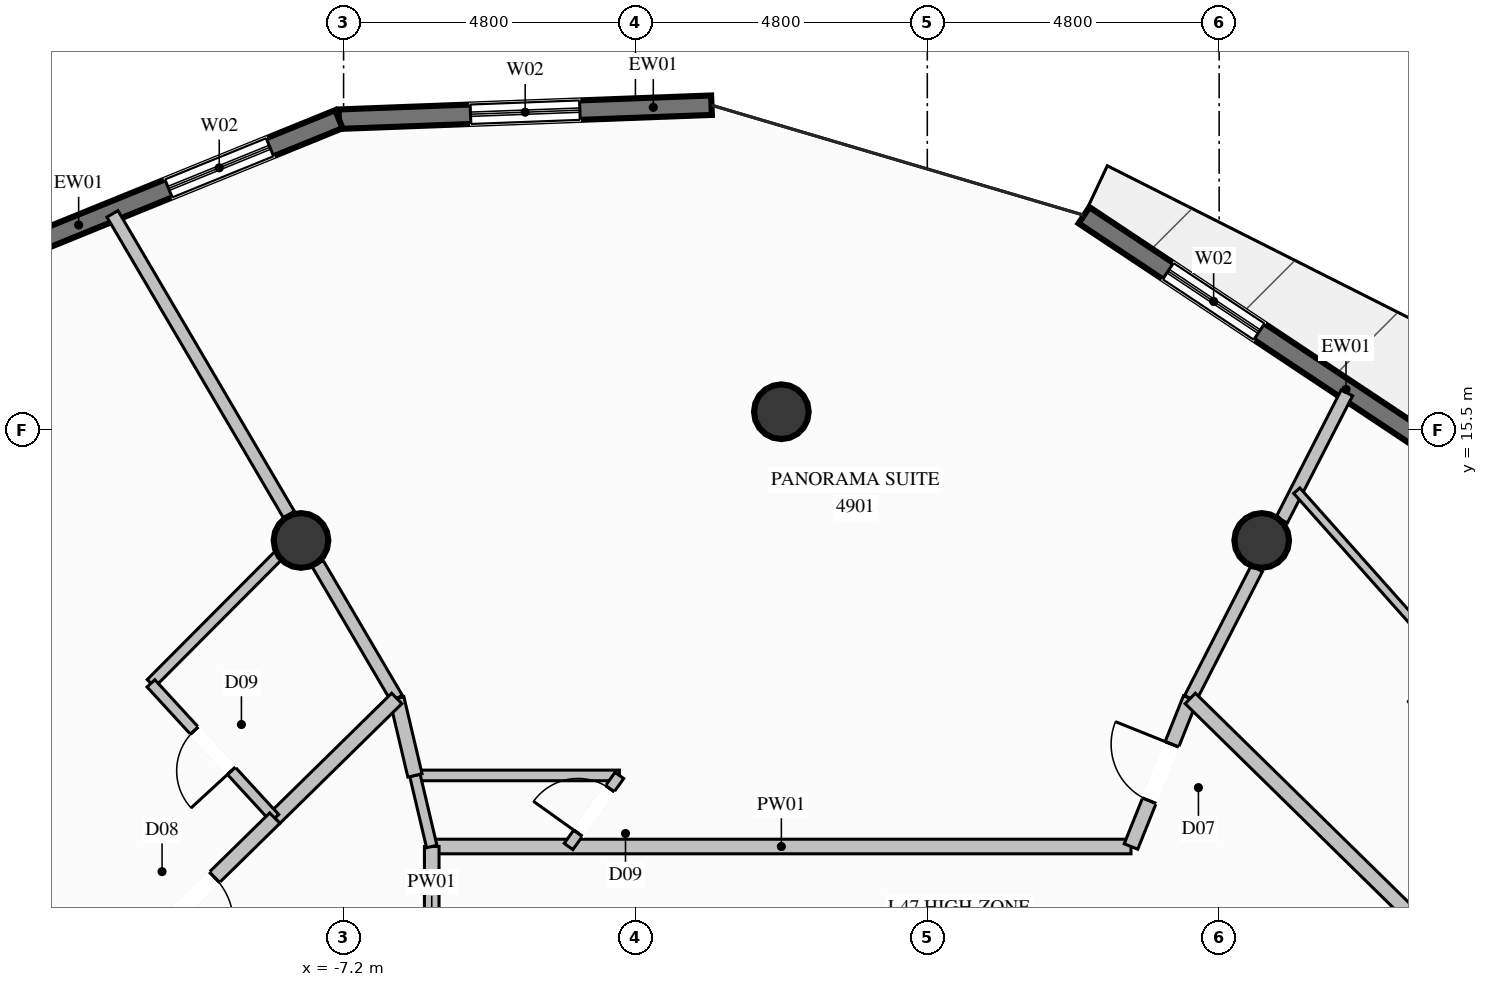
"""IFC4 building model, lengths in metres.
Left out: names, types, materials, properties, quantities, classifications, styles, units other than length and angle.
Written with IfcOpenShell. Run it as: python <this file> out.ifc"""

import sys

from ifc_helpers import new_model, si_unit, direction, frame, frame_2d, origin, origin_2d, place, context, subcontext, project, spatial, rectangle, circle, extrude, element, fill, save


model = new_model("IFC4")
c1 = context("Model", 3, precision=1e-05, world=origin(), true_north=direction((0.0, 1.0)))
c2 = subcontext(c1, "Body", "Model", "MODEL_VIEW")
j1 = project(units=[si_unit("LENGTHUNIT", "METRE"), si_unit("PLANEANGLEUNIT", "RADIAN")], contexts=[c1])
p1 = place(None, origin())
s1 = spatial("IfcSite", under=j1, at=p1, CompositionType="ELEMENT")
p2 = place(p1, origin())
s2 = spatial("IfcBuilding", under=s1, at=p2, CompositionType="ELEMENT")
p3 = place(p2, frame((0.0, 0.0, 184.0)))
s3 = spatial("IfcBuildingStorey", under=s2, at=p3, CompositionType="ELEMENT", Elevation=184.0)
for number, where, z_axis, x_axis in (
    (1, (7.9, 13.683, 0.0), (0.0, 0.0, 1.0), (1.0, 0.0, 0.0)),
    (2, (0.0, 15.8, 0.0), (0.0, 0.0, 1.0), (1.0, 0.0, 0.0)),
    (3, (-7.9, 13.683, 0.0), (0.0, 0.0, 1.0), (1.0, 0.0, 0.0)),
):
    element("IfcColumn", number, at=place(p3, frame(where, z_axis=z_axis, x_axis=x_axis)), inside=s3, PredefinedType="COLUMN", context=c2, shape_type="SweptSolid", body=[
        extrude(circle(Radius=0.45, at=origin_2d()), origin(), (0.0, 0.0, 1.0), 3.6),
    ])
p4 = place(p3, frame((4.978, 19.031, 0.0), z_axis=(0.0, 0.0, 1.0), x_axis=(0.832836009007, -0.553519811842, 0.0)))
e4 = element("IfcWall", 4, at=p4, inside=s3, PredefinedType="SOLIDWALL", context=c2, shape_type="SweptSolid", body=[
    extrude(rectangle(XDim=6.638, YDim=0.32, at=frame_2d((3.319, 0.0))), origin(), (0.0, 0.0, 1.0), 3.36),
])
p5 = place(p4, frame((1.659, 0.0, 0.35)))
e5 = element("IfcOpeningElement", 5, at=p5, cuts=e4, PredefinedType="OPENING", context=c2, shape_type="SweptSolid", body=[
    extrude(rectangle(XDim=1.8, YDim=2.6, at=frame_2d((0.9, 1.3))), frame((0.0, 0.17, 0.0), z_axis=(0.0, -1.0, 0.0), x_axis=(1.0, 0.0, 0.0)), (0.0, 0.0, 1.0), 0.34),
])
p6 = place(p3, frame((-7.277, 20.611, 0.0), z_axis=(0.0, 0.0, 1.0), x_axis=(0.999296553101, 0.037501986097, 0.0)))
e6 = element("IfcWall", 6, at=p6, inside=s3, PredefinedType="SOLIDWALL", context=c2, shape_type="SweptSolid", body=[
    extrude(rectangle(XDim=6.133, YDim=0.32, at=frame_2d((3.066, 0.0))), origin(), (0.0, 0.0, 1.0), 3.36),
])
p7 = place(p6, frame((2.166, 0.0, 0.35)))
e7 = element("IfcOpeningElement", 7, at=p7, cuts=e6, PredefinedType="OPENING", context=c2, shape_type="SweptSolid", body=[
    extrude(rectangle(XDim=1.8, YDim=2.6, at=frame_2d((0.9, 1.3))), frame((0.0, 0.17, 0.0), z_axis=(0.0, -1.0, 0.0), x_axis=(1.0, 0.0, 0.0)), (0.0, 0.0, 1.0), 0.34),
])
p8 = place(p3, frame((-12.804, 18.364, 0.0), z_axis=(0.0, 0.0, 1.0), x_axis=(0.926362198949, 0.376633875745, 0.0)))
e8 = element("IfcWall", 8, at=p8, inside=s3, PredefinedType="SOLIDWALL", context=c2, shape_type="SweptSolid", body=[
    extrude(rectangle(XDim=5.966, YDim=0.32, at=frame_2d((2.983, 0.0))), origin(), (0.0, 0.0, 1.0), 3.36),
])
p9 = place(p8, frame((2.942, 0.0, 0.35)))
e9 = element("IfcOpeningElement", 9, at=p9, cuts=e8, PredefinedType="OPENING", context=c2, shape_type="SweptSolid", body=[
    extrude(rectangle(XDim=1.8, YDim=2.6, at=frame_2d((0.9, 1.3))), frame((0.0, 0.17, 0.0), z_axis=(0.0, -1.0, 0.0), x_axis=(1.0, 0.0, 0.0)), (0.0, 0.0, 1.0), 0.34),
])
p10 = place(p3, frame((-5.75, 8.65, 0.0), z_axis=(0.0, 0.0, 1.0), x_axis=(1.0, 0.0, 0.0)))
e10 = element("IfcWall", 10, at=p10, inside=s3, PredefinedType="PARTITIONING", context=c2, shape_type="SweptSolid", body=[
    extrude(rectangle(XDim=11.5, YDim=0.24, at=frame_2d((5.75, 0.0))), origin(), (0.0, 0.0, 1.0), 3.36),
])
p11 = place(p3, frame((-5.75, 6.1, 0.0), z_axis=(0.0, 0.0, 1.0), x_axis=(0.0, 1.0, 0.0)))
e11 = element("IfcWall", 11, at=p11, inside=s3, PredefinedType="PARTITIONING", context=c2, shape_type="SweptSolid", body=[
    extrude(rectangle(XDim=2.55, YDim=0.24, at=frame_2d((1.275, 0.0))), origin(), (0.0, 0.0, 1.0), 3.36),
])
p12 = place(p3, frame((6.725, 11.085, 0.0), z_axis=(0.0, 0.0, 1.0), x_axis=(0.456025303107, 0.889966810014, 0.0)))
e12 = element("IfcWall", 12, at=p12, inside=s3, PredefinedType="PARTITIONING", context=c2, shape_type="SweptSolid", body=[
    extrude(rectangle(XDim=2.399, YDim=0.21, at=frame_2d((1.199, 0.0))), origin(), (0.0, 0.0, 1.0), 2.877),
])
p13 = place(p3, frame((8.229, 14.019, 0.0), z_axis=(0.0, 0.0, 1.0), x_axis=(0.456209070118, 0.889872622538, 0.0)))
e13 = element("IfcWall", 13, at=p13, inside=s3, PredefinedType="PARTITIONING", context=c2, shape_type="SweptSolid", body=[
    extrude(rectangle(XDim=2.35, YDim=0.21, at=frame_2d((1.175, 0.0))), origin(), (0.0, 0.0, 1.0), 3.36),
])
p14 = place(p3, frame((-6.325, 11.085, 0.0), z_axis=(0.0, 0.0, 1.0), x_axis=(-0.506285052897, 0.862366189744, 0.0)))
e14 = element("IfcWall", 14, at=p14, inside=s3, PredefinedType="PARTITIONING", context=c2, shape_type="SweptSolid", body=[
    extrude(rectangle(XDim=2.57, YDim=0.21, at=frame_2d((1.285, 0.0))), origin(), (0.0, 0.0, 1.0), 2.877),
])
p15 = place(p3, frame((-8.099, 14.109, 0.0), z_axis=(0.0, 0.0, 1.0), x_axis=(-0.506111753197, 0.862467908548, 0.0)))
e15 = element("IfcWall", 15, at=p15, inside=s3, PredefinedType="PARTITIONING", context=c2, shape_type="SweptSolid", body=[
    extrude(rectangle(XDim=5.734, YDim=0.21, at=frame_2d((2.867, 0.0))), origin(), (0.0, 0.0, 1.0), 3.36),
])
p16 = place(p3, frame((-6.026, 9.819, 0.0), z_axis=(0.0, 0.0, 1.0), x_axis=(1.0, 0.0, 0.0)))
e16 = element("IfcWall", 16, at=p16, inside=s3, PredefinedType="PLUMBINGWALL", context=c2, shape_type="SweptSolid", body=[
    extrude(rectangle(XDim=3.362, YDim=0.175, at=frame_2d((1.681, 0.0))), origin(), (0.0, 0.0, 1.0), 3.043),
])
p17 = place(p3, frame((-6.026, 9.819, 0.0), z_axis=(0.0, 0.0, 1.0), x_axis=(0.229650980365, -0.973273048644, 0.0)))
e17 = element("IfcWall", 17, at=p17, inside=s3, PredefinedType="PLUMBINGWALL", context=c2, shape_type="SweptSolid", body=[
    extrude(rectangle(XDim=1.201, YDim=0.175, at=frame_2d((0.601, 0.0))), origin(), (0.0, 0.0, 1.0), 3.36),
])
p18 = place(p3, frame((-3.5, 8.65, 0.0), z_axis=(0.0, 0.0, 1.0), x_axis=(0.581607698531, 0.813469412461, 0.0)))
e18 = element("IfcWall", 18, at=p18, inside=s3, PredefinedType="PLUMBINGWALL", context=c2, shape_type="SweptSolid", body=[
    extrude(rectangle(XDim=1.437, YDim=0.175, at=frame_2d((0.719, 0.0))), origin(), (0.0, 0.0, 1.0), 3.36),
])
p19 = place(p18, frame((0.269, 0.0, 0.0)))
e19 = element("IfcOpeningElement", 19, at=p19, cuts=e18, PredefinedType="OPENING", context=c2, shape_type="SweptSolid", body=[
    extrude(rectangle(XDim=0.9, YDim=2.1, at=frame_2d((0.45, 1.05))), frame((0.0, 0.098, 0.0), z_axis=(0.0, -1.0, 0.0), x_axis=(1.0, 0.0, 0.0)), (0.0, 0.0, 1.0), 0.195),
])
p20 = place(p3, frame((-6.026, 9.819, 0.0), z_axis=(0.0, 0.0, 1.0), x_axis=(-0.229928489857, 0.973207526457, 0.0)))
e20 = element("IfcWall", 20, at=p20, inside=s3, PredefinedType="PARTITIONING", context=c2, shape_type="SweptSolid", body=[
    extrude(rectangle(XDim=1.301, YDim=0.24, at=frame_2d((0.65, 0.0))), origin(), (0.0, 0.0, 1.0), 3.36),
])
p21 = place(p3, frame((5.75, 8.65, 0.0), z_axis=(0.0, 0.0, 1.0), x_axis=(0.371743694646, 0.928335405708, 0.0)))
e21 = element("IfcWall", 21, at=p21, inside=s3, PredefinedType="PARTITIONING", context=c2, shape_type="SweptSolid", body=[
    extrude(rectangle(XDim=2.623, YDim=0.24, at=frame_2d((1.312, 0.0))), origin(), (0.0, 0.0, 1.0), 3.36),
])
p22 = place(p21, frame((0.811, 0.0, 0.0)))
e22 = element("IfcOpeningElement", 22, at=p22, cuts=e21, PredefinedType="OPENING", context=c2, shape_type="SweptSolid", body=[
    extrude(rectangle(XDim=1.0, YDim=2.2, at=frame_2d((0.5, 1.1))), frame((0.0, 0.13, 0.0), z_axis=(0.0, -1.0, 0.0), x_axis=(1.0, 0.0, 0.0)), (0.0, 0.0, 1.0), 0.26),
])
p23 = place(p3, frame((-6.325, 11.085, 0.0), z_axis=(0.0, 0.0, 1.0), x_axis=(-0.713850549357, -0.700298074524, 0.0)))
e23 = element("IfcWall", 23, at=p23, inside=s3, PredefinedType="PARTITIONING", context=c2, shape_type="SweptSolid", body=[
    extrude(rectangle(XDim=2.81, YDim=0.24, at=frame_2d((1.405, 0.0))), origin(), (0.0, 0.0, 1.0), 3.36),
])
p24 = place(p3, frame((-7.915, 13.794, 0.0), z_axis=(0.0, 0.0, 1.0), x_axis=(-0.70594646808, -0.708265193416, 0.0)))
e24 = element("IfcWall", 24, at=p24, inside=s3, PredefinedType="PLUMBINGWALL", context=c2, shape_type="SweptSolid", body=[
    extrude(rectangle(XDim=3.475, YDim=0.175, at=frame_2d((1.737, 0.0))), origin(), (0.0, 0.0, 1.0), 2.929),
])
p25 = place(p3, frame((-8.331, 9.117, 0.0), z_axis=(0.0, 0.0, 1.0), x_axis=(-0.676712049705, 0.736247785589, 0.0)))
e25 = element("IfcWall", 25, at=p25, inside=s3, PredefinedType="PLUMBINGWALL", context=c2, shape_type="SweptSolid", body=[
    extrude(rectangle(XDim=3.01, YDim=0.175, at=frame_2d((1.505, 0.0))), origin(), (0.0, 0.0, 1.0), 3.36),
])
p26 = place(p25, frame((1.055, 0.0, 0.0)))
e26 = element("IfcOpeningElement", 26, at=p26, cuts=e25, PredefinedType="OPENING", context=c2, shape_type="SweptSolid", body=[
    extrude(rectangle(XDim=0.9, YDim=2.1, at=frame_2d((0.45, 1.05))), frame((0.0, 0.098, 0.0), z_axis=(0.0, -1.0, 0.0), x_axis=(1.0, 0.0, 0.0)), (0.0, 0.0, 1.0), 0.195),
])
p27 = place(p3, frame((-8.331, 9.117, 0.0), z_axis=(0.0, 0.0, 1.0), x_axis=(-0.714024122855, -0.700121098084, 0.0)))
e27 = element("IfcWall", 27, at=p27, inside=s3, PredefinedType="PARTITIONING", context=c2, shape_type="SweptSolid", body=[
    extrude(rectangle(XDim=3.881, YDim=0.24, at=frame_2d((1.94, 0.0))), origin(), (0.0, 0.0, 1.0), 3.36),
])
p28 = place(p27, frame((1.39, 0.0, 0.0)))
e28 = element("IfcOpeningElement", 28, at=p28, cuts=e27, PredefinedType="OPENING", context=c2, shape_type="SweptSolid", body=[
    extrude(rectangle(XDim=1.1, YDim=2.3, at=frame_2d((0.55, 1.15))), frame((0.0, 0.13, 0.0), z_axis=(0.0, -1.0, 0.0), x_axis=(1.0, 0.0, 0.0)), (0.0, 0.0, 1.0), 0.26),
])
p29 = place(p3, frame((11.502, 6.4, 0.0), z_axis=(0.0, 0.0, 1.0), x_axis=(-0.713933337596, 0.700213674152, 0.0)))
e29 = element("IfcWall", 29, at=p29, inside=s3, PredefinedType="PARTITIONING", context=c2, shape_type="SweptSolid", body=[
    extrude(rectangle(XDim=6.691, YDim=0.24, at=frame_2d((3.345, 0.0))), origin(), (0.0, 0.0, 1.0), 3.36),
])
p30 = place(p3, frame((14.172, 8.105, 0.0), z_axis=(0.0, 0.0, 1.0), x_axis=(-0.664942198266, 0.74689482055, 0.0)))
e30 = element("IfcWall", 30, at=p30, inside=s3, PredefinedType="PARTITIONING", context=c2, shape_type="SweptSolid", body=[
    extrude(rectangle(XDim=8.565, YDim=0.135, at=frame_2d((4.282, 0.0))), origin(), (0.0, 0.0, 1.0), 2.929),
])
p31 = place(p30, frame((3.807, 0.0, 0.0)))
e31 = element("IfcOpeningElement", 31, at=p31, cuts=e30, PredefinedType="OPENING", context=c2, shape_type="SweptSolid", body=[
    extrude(rectangle(XDim=0.95, YDim=2.1, at=frame_2d((0.475, 1.05))), frame((0.0, 0.078, 0.0), z_axis=(0.0, -1.0, 0.0), x_axis=(1.0, 0.0, 0.0)), (0.0, 0.0, 1.0), 0.155),
])
p32 = place(p5, origin())
e32 = element("IfcWindow", 32, at=p32, inside=s3, PartitioningType="SINGLE_PANEL", PredefinedType="WINDOW", context=c2, shape_type="SweptSolid", body=[
    extrude(rectangle(XDim=1.8, YDim=2.6, at=frame_2d((0.9, 1.3))), frame((0.0, 0.03, 0.0), z_axis=(0.0, -1.0, 0.0), x_axis=(1.0, 0.0, 0.0)), (0.0, 0.0, 1.0), 0.06),
])
fill(e5, e32)
p33 = place(p7, origin())
e33 = element("IfcWindow", 33, at=p33, inside=s3, PartitioningType="SINGLE_PANEL", PredefinedType="WINDOW", context=c2, shape_type="SweptSolid", body=[
    extrude(rectangle(XDim=1.8, YDim=2.6, at=frame_2d((0.9, 1.3))), frame((0.0, 0.03, 0.0), z_axis=(0.0, -1.0, 0.0), x_axis=(1.0, 0.0, 0.0)), (0.0, 0.0, 1.0), 0.06),
])
fill(e7, e33)
p34 = place(p9, origin())
e34 = element("IfcWindow", 34, at=p34, inside=s3, PartitioningType="SINGLE_PANEL", PredefinedType="WINDOW", context=c2, shape_type="SweptSolid", body=[
    extrude(rectangle(XDim=1.8, YDim=2.6, at=frame_2d((0.9, 1.3))), frame((0.0, 0.03, 0.0), z_axis=(0.0, -1.0, 0.0), x_axis=(1.0, 0.0, 0.0)), (0.0, 0.0, 1.0), 0.06),
])
fill(e9, e34)
p35 = place(p19, origin())
e35 = element("IfcDoor", 35, at=p35, inside=s3, OperationType="SINGLE_SWING_LEFT", PredefinedType="DOOR", context=c2, shape_type="SweptSolid", body=[
    extrude(rectangle(XDim=0.9, YDim=2.1, at=frame_2d((0.45, 1.05))), frame((0.0, 0.025, 0.0), z_axis=(0.0, -1.0, 0.0), x_axis=(1.0, 0.0, 0.0)), (0.0, 0.0, 1.0), 0.05),
])
fill(e19, e35)
p36 = place(p22, origin())
e36 = element("IfcDoor", 36, at=p36, inside=s3, OperationType="SINGLE_SWING_RIGHT", PredefinedType="DOOR", context=c2, shape_type="SweptSolid", body=[
    extrude(rectangle(XDim=1.0, YDim=2.2, at=frame_2d((0.5, 1.1))), frame((0.0, 0.025, 0.0), z_axis=(0.0, -1.0, 0.0), x_axis=(1.0, 0.0, 0.0)), (0.0, 0.0, 1.0), 0.05),
])
fill(e22, e36)
p37 = place(p26, origin())
e37 = element("IfcDoor", 37, at=p37, inside=s3, OperationType="SINGLE_SWING_LEFT", PredefinedType="DOOR", context=c2, shape_type="SweptSolid", body=[
    extrude(rectangle(XDim=0.9, YDim=2.1, at=frame_2d((0.45, 1.05))), frame((0.0, 0.025, 0.0), z_axis=(0.0, -1.0, 0.0), x_axis=(1.0, 0.0, 0.0)), (0.0, 0.0, 1.0), 0.05),
])
fill(e26, e37)
p38 = place(p28, origin())
e38 = element("IfcDoor", 38, at=p38, inside=s3, OperationType="SINGLE_SWING_RIGHT", PredefinedType="DOOR", context=c2, shape_type="SweptSolid", body=[
    extrude(rectangle(XDim=1.1, YDim=2.3, at=frame_2d((0.55, 1.15))), frame((0.0, 0.025, 0.0), z_axis=(0.0, -1.0, 0.0), x_axis=(1.0, 0.0, 0.0)), (0.0, 0.0, 1.0), 0.05),
])
fill(e28, e38)
save(model, sys.argv[1])
